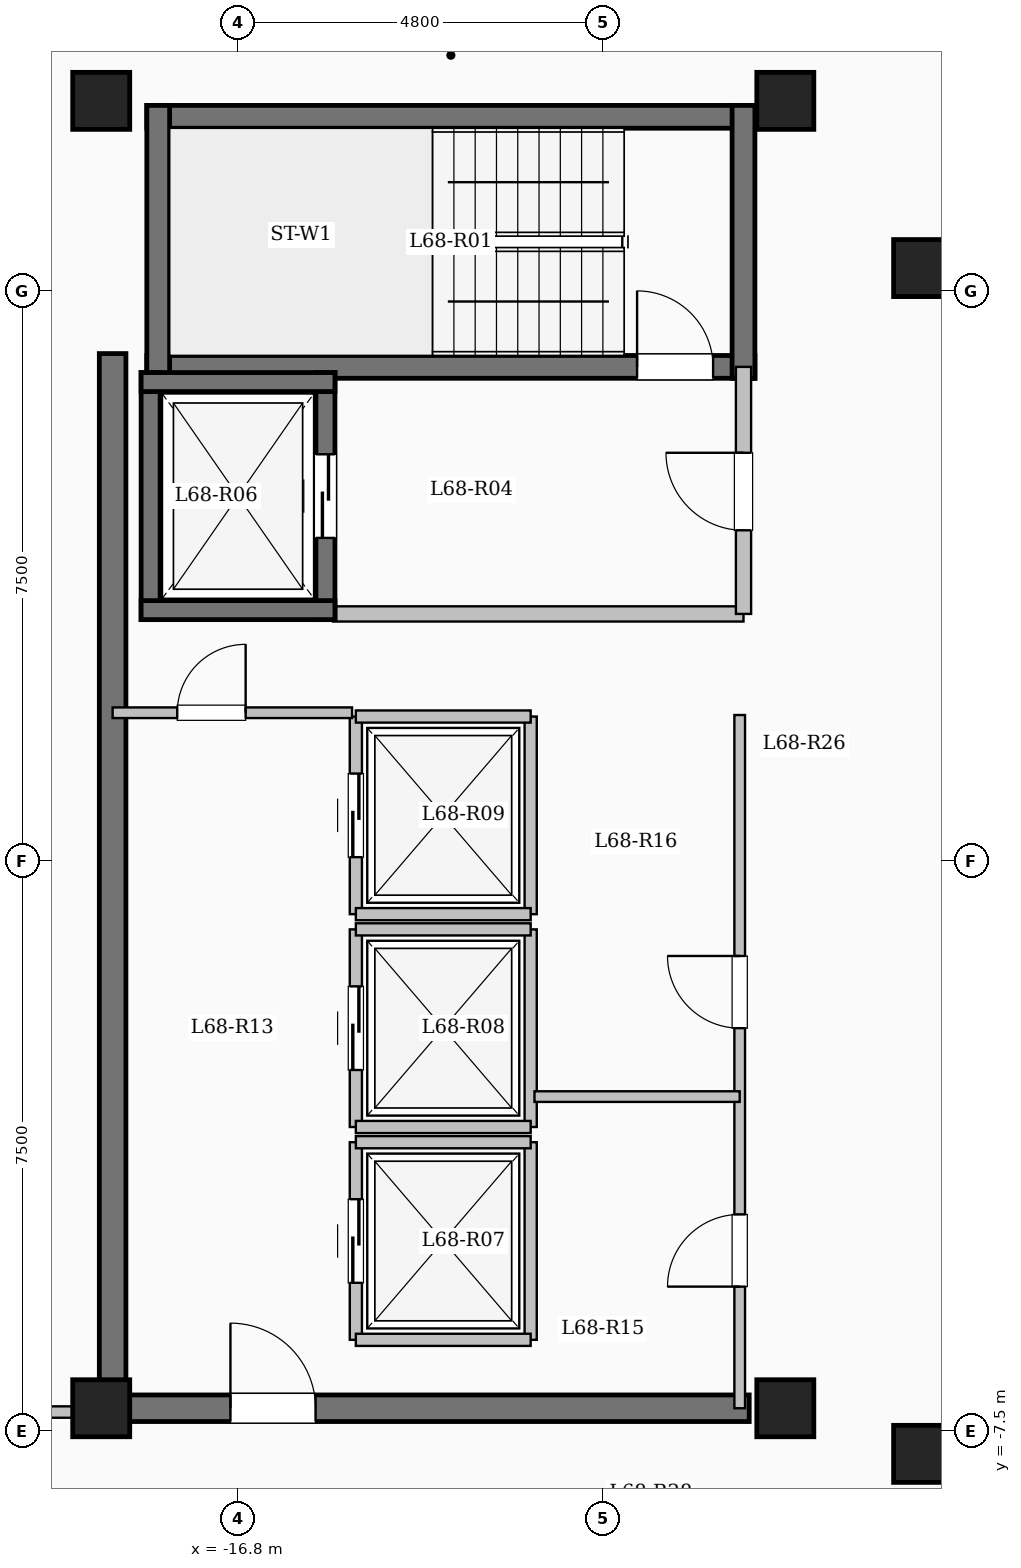
"""IFC4 building model, lengths in metres.
Left out: names, types, materials, properties, quantities, classifications, styles, units other than length and angle.
Written with IfcOpenShell. Run it as: python <this file> out.ifc"""

import sys

from ifc_helpers import new_model, si_unit, direction, frame, frame_2d, origin, origin_2d, place, context, subcontext, project, spatial, rectangle, extrude, element, fill, save


model = new_model("IFC4")
c1 = context("Model", 3, precision=1e-05, world=origin(), true_north=direction((0.0, 1.0)))
c2 = subcontext(c1, "Body", "Model", "MODEL_VIEW")
j1 = project(units=[si_unit("LENGTHUNIT", "METRE"), si_unit("PLANEANGLEUNIT", "RADIAN")], contexts=[c1])
p1 = place(None, origin())
s1 = spatial("IfcSite", under=j1, at=p1, CompositionType="ELEMENT")
p2 = place(p1, origin())
s2 = spatial("IfcBuilding", under=s1, at=p2, CompositionType="ELEMENT")
p3 = place(p2, frame((0.0, 0.0, 251.55)))
s3 = spatial("IfcBuildingStorey", under=s2, at=p3, CompositionType="ELEMENT", Elevation=251.55)
for number, where, z_axis, x_axis in (
    (1, (-7.8, -7.8, 0.0), (0.0, 0.0, 1.0), (1.0, 0.0, 0.0)),
    (2, (-7.8, 7.8, 0.0), (0.0, 0.0, 1.0), (1.0, 0.0, 0.0)),
    (3, (-9.6, -7.2, 0.0), (0.0, 0.0, 1.0), (1.0, 0.0, 0.0)),
    (4, (-9.6, 10.0, 0.0), (0.0, 0.0, 1.0), (1.0, 0.0, 0.0)),
    (5, (-18.6, -7.2, 0.0), (0.0, 0.0, 1.0), (1.0, 0.0, 0.0)),
    (6, (-18.6, 10.0, 0.0), (0.0, 0.0, 1.0), (1.0, 0.0, 0.0)),
):
    element("IfcColumn", number, at=place(p3, frame(where, z_axis=z_axis, x_axis=x_axis)), inside=s3, PredefinedType="COLUMN", context=c2, shape_type="SweptSolid", body=[
        extrude(rectangle(XDim=0.75, YDim=0.75, at=origin_2d()), origin(), (0.0, 0.0, 1.0), 3.35),
    ])
p4 = place(p3, frame((-18.0, 9.79, 0.0), z_axis=(0.0, 0.0, 1.0), x_axis=(1.0, 0.0, 0.0)))
e7 = element("IfcWall", 7, at=p4, inside=s3, PredefinedType="SHEAR", context=c2, shape_type="SweptSolid", body=[
    extrude(rectangle(XDim=8.0, YDim=0.3, at=frame_2d((4.0, 0.0))), origin(), (0.0, 0.0, 1.0), 3.35),
])
p5 = place(p3, frame((-18.0, 6.5, 0.0), z_axis=(0.0, 0.0, 1.0), x_axis=(1.0, 0.0, 0.0)))
e8 = element("IfcWall", 8, at=p5, inside=s3, PredefinedType="SHEAR", context=c2, shape_type="SweptSolid", body=[
    extrude(rectangle(XDim=8.0, YDim=0.3, at=frame_2d((4.0, 0.0))), origin(), (0.0, 0.0, 1.0), 3.35),
])
p6 = place(p5, frame((6.45, 0.0, 0.0)))
e9 = element("IfcOpeningElement", 9, at=p6, cuts=e8, PredefinedType="OPENING", context=c2, shape_type="SweptSolid", body=[
    extrude(rectangle(XDim=1.0, YDim=2.15, at=frame_2d((0.5, 1.075))), frame((0.0, 0.16, 0.0), z_axis=(0.0, -1.0, 0.0), x_axis=(1.0, 0.0, 0.0)), (0.0, 0.0, 1.0), 0.32),
])
for number, where, z_axis, x_axis in (
    (10, (-17.85, 6.35, 0.0), (0.0, 0.0, 1.0), (0.0, 1.0, 0.0)),
    (11, (-10.15, 6.35, 0.0), (0.0, 0.0, 1.0), (0.0, 1.0, 0.0)),
):
    element("IfcWall", number, at=place(p3, frame(where, z_axis=z_axis, x_axis=x_axis)), inside=s3, PredefinedType="SHEAR", context=c2, shape_type="SweptSolid", body=[
        extrude(rectangle(XDim=3.59, YDim=0.3, at=frame_2d((1.795, 0.0))), origin(), (0.0, 0.0, 1.0), 3.35),
    ])
p7 = place(p3, frame((-15.55, 3.25, 0.0), z_axis=(0.0, 0.0, 1.0), x_axis=(1.0, 0.0, 0.0)))
e12 = element("IfcWall", 12, at=p7, inside=s3, PredefinedType="SOLIDWALL", context=c2, shape_type="SweptSolid", body=[
    extrude(rectangle(XDim=5.4, YDim=0.2, at=frame_2d((2.7, 0.0))), origin(), (0.0, 0.0, 1.0), 3.1),
])
p8 = place(p3, frame((-10.15, 3.25, 0.0), z_axis=(0.0, 0.0, 1.0), x_axis=(0.0, 1.0, 0.0)))
e13 = element("IfcWall", 13, at=p8, inside=s3, PredefinedType="SOLIDWALL", context=c2, shape_type="SweptSolid", body=[
    extrude(rectangle(XDim=3.25, YDim=0.2, at=frame_2d((1.625, 0.0))), origin(), (0.0, 0.0, 1.0), 3.1),
])
p9 = place(p8, frame((1.1, 0.0, 0.0)))
e14 = element("IfcOpeningElement", 14, at=p9, cuts=e13, PredefinedType="OPENING", context=c2, shape_type="SweptSolid", body=[
    extrude(rectangle(XDim=1.02, YDim=2.15, at=frame_2d((0.51, 1.075))), frame((0.0, 0.11, 0.0), z_axis=(0.0, -1.0, 0.0), x_axis=(1.0, 0.0, 0.0)), (0.0, 0.0, 1.0), 0.22),
])
p10 = place(p3, frame((-17.95, 3.175, 0.0), z_axis=(0.0, 0.0, 1.0), x_axis=(0.0, 1.0, 0.0)))
e15 = element("IfcWall", 15, at=p10, inside=s3, PredefinedType="SHEAR", context=c2, shape_type="SweptSolid", body=[
    extrude(rectangle(XDim=3.25, YDim=0.25, at=frame_2d((1.625, 0.0))), origin(), (0.0, 0.0, 1.0), 3.35),
])
p11 = place(p3, frame((-15.65, 3.175, 0.0), z_axis=(0.0, 0.0, 1.0), x_axis=(0.0, 1.0, 0.0)))
e16 = element("IfcWall", 16, at=p11, inside=s3, PredefinedType="SHEAR", context=c2, shape_type="SweptSolid", body=[
    extrude(rectangle(XDim=3.25, YDim=0.25, at=frame_2d((1.625, 0.0))), origin(), (0.0, 0.0, 1.0), 3.35),
])
p12 = place(p11, frame((1.075, 0.0, 0.0)))
e17 = element("IfcOpeningElement", 17, at=p12, cuts=e16, PredefinedType="OPENING", context=c2, shape_type="SweptSolid", body=[
    extrude(rectangle(XDim=1.1, YDim=2.15, at=frame_2d((0.55, 1.075))), frame((0.0, 0.135, 0.0), z_axis=(0.0, -1.0, 0.0), x_axis=(1.0, 0.0, 0.0)), (0.0, 0.0, 1.0), 0.27),
])
for number, where, z_axis, x_axis in (
    (18, (-18.075, 3.3, 0.0), (0.0, 0.0, 1.0), (1.0, 0.0, 0.0)),
    (19, (-18.075, 6.3, 0.0), (0.0, 0.0, 1.0), (1.0, 0.0, 0.0)),
):
    element("IfcWall", number, at=place(p3, frame(where, z_axis=z_axis, x_axis=x_axis)), inside=s3, PredefinedType="SHEAR", context=c2, shape_type="SweptSolid", body=[
        extrude(rectangle(XDim=2.55, YDim=0.25, at=frame_2d((1.275, 0.0))), origin(), (0.0, 0.0, 1.0), 3.35),
    ])
p13 = place(p3, frame((-15.25, -6.3, 0.0), z_axis=(0.0, 0.0, 1.0), x_axis=(0.0, 1.0, 0.0)))
e20 = element("IfcWall", 20, at=p13, inside=s3, PredefinedType="SOLIDWALL", context=c2, shape_type="SweptSolid", body=[
    extrude(rectangle(XDim=2.6, YDim=0.16, at=frame_2d((1.3, 0.0))), origin(), (0.0, 0.0, 1.0), 3.1),
])
p14 = place(p13, frame((0.75, 0.0, 0.0)))
e21 = element("IfcOpeningElement", 21, at=p14, cuts=e20, PredefinedType="OPENING", context=c2, shape_type="SweptSolid", body=[
    extrude(rectangle(XDim=1.1, YDim=2.15, at=frame_2d((0.55, 1.075))), frame((0.0, 0.09, 0.0), z_axis=(0.0, -1.0, 0.0), x_axis=(1.0, 0.0, 0.0)), (0.0, 0.0, 1.0), 0.18),
])
p15 = place(p3, frame((-12.95, -6.3, 0.0), z_axis=(0.0, 0.0, 1.0), x_axis=(0.0, 1.0, 0.0)))
e22 = element("IfcWall", 22, at=p15, inside=s3, PredefinedType="SOLIDWALL", context=c2, shape_type="SweptSolid", body=[
    extrude(rectangle(XDim=2.6, YDim=0.16, at=frame_2d((1.3, 0.0))), origin(), (0.0, 0.0, 1.0), 3.1),
])
for number, where, z_axis, x_axis in (
    (23, (-15.25, -6.3, 0.0), (0.0, 0.0, 1.0), (1.0, 0.0, 0.0)),
    (24, (-15.25, -3.7, 0.0), (0.0, 0.0, 1.0), (1.0, 0.0, 0.0)),
):
    element("IfcWall", number, at=place(p3, frame(where, z_axis=z_axis, x_axis=x_axis)), inside=s3, PredefinedType="SOLIDWALL", context=c2, shape_type="SweptSolid", body=[
        extrude(rectangle(XDim=2.3, YDim=0.16, at=frame_2d((1.15, 0.0))), origin(), (0.0, 0.0, 1.0), 3.1),
    ])
p16 = place(p3, frame((-15.25, -3.5, 0.0), z_axis=(0.0, 0.0, 1.0), x_axis=(0.0, 1.0, 0.0)))
e25 = element("IfcWall", 25, at=p16, inside=s3, PredefinedType="SOLIDWALL", context=c2, shape_type="SweptSolid", body=[
    extrude(rectangle(XDim=2.6, YDim=0.16, at=frame_2d((1.3, 0.0))), origin(), (0.0, 0.0, 1.0), 3.1),
])
p17 = place(p16, frame((0.75, 0.0, 0.0)))
e26 = element("IfcOpeningElement", 26, at=p17, cuts=e25, PredefinedType="OPENING", context=c2, shape_type="SweptSolid", body=[
    extrude(rectangle(XDim=1.1, YDim=2.15, at=frame_2d((0.55, 1.075))), frame((0.0, 0.09, 0.0), z_axis=(0.0, -1.0, 0.0), x_axis=(1.0, 0.0, 0.0)), (0.0, 0.0, 1.0), 0.18),
])
p18 = place(p3, frame((-12.95, -3.5, 0.0), z_axis=(0.0, 0.0, 1.0), x_axis=(0.0, 1.0, 0.0)))
e27 = element("IfcWall", 27, at=p18, inside=s3, PredefinedType="SOLIDWALL", context=c2, shape_type="SweptSolid", body=[
    extrude(rectangle(XDim=2.6, YDim=0.16, at=frame_2d((1.3, 0.0))), origin(), (0.0, 0.0, 1.0), 3.1),
])
for number, where, z_axis, x_axis in (
    (28, (-15.25, -3.5, 0.0), (0.0, 0.0, 1.0), (1.0, 0.0, 0.0)),
    (29, (-15.25, -0.9, 0.0), (0.0, 0.0, 1.0), (1.0, 0.0, 0.0)),
):
    element("IfcWall", number, at=place(p3, frame(where, z_axis=z_axis, x_axis=x_axis)), inside=s3, PredefinedType="SOLIDWALL", context=c2, shape_type="SweptSolid", body=[
        extrude(rectangle(XDim=2.3, YDim=0.16, at=frame_2d((1.15, 0.0))), origin(), (0.0, 0.0, 1.0), 3.1),
    ])
p19 = place(p3, frame((-15.25, -0.7, 0.0), z_axis=(0.0, 0.0, 1.0), x_axis=(0.0, 1.0, 0.0)))
e30 = element("IfcWall", 30, at=p19, inside=s3, PredefinedType="SOLIDWALL", context=c2, shape_type="SweptSolid", body=[
    extrude(rectangle(XDim=2.6, YDim=0.16, at=frame_2d((1.3, 0.0))), origin(), (0.0, 0.0, 1.0), 3.1),
])
p20 = place(p19, frame((0.75, 0.0, 0.0)))
e31 = element("IfcOpeningElement", 31, at=p20, cuts=e30, PredefinedType="OPENING", context=c2, shape_type="SweptSolid", body=[
    extrude(rectangle(XDim=1.1, YDim=2.15, at=frame_2d((0.55, 1.075))), frame((0.0, 0.09, 0.0), z_axis=(0.0, -1.0, 0.0), x_axis=(1.0, 0.0, 0.0)), (0.0, 0.0, 1.0), 0.18),
])
p21 = place(p3, frame((-12.95, -0.7, 0.0), z_axis=(0.0, 0.0, 1.0), x_axis=(0.0, 1.0, 0.0)))
e32 = element("IfcWall", 32, at=p21, inside=s3, PredefinedType="SOLIDWALL", context=c2, shape_type="SweptSolid", body=[
    extrude(rectangle(XDim=2.6, YDim=0.16, at=frame_2d((1.3, 0.0))), origin(), (0.0, 0.0, 1.0), 3.1),
])
for number, where, z_axis, x_axis in (
    (33, (-15.25, -0.7, 0.0), (0.0, 0.0, 1.0), (1.0, 0.0, 0.0)),
    (34, (-15.25, 1.9, 0.0), (0.0, 0.0, 1.0), (1.0, 0.0, 0.0)),
):
    element("IfcWall", number, at=place(p3, frame(where, z_axis=z_axis, x_axis=x_axis)), inside=s3, PredefinedType="SOLIDWALL", context=c2, shape_type="SweptSolid", body=[
        extrude(rectangle(XDim=2.3, YDim=0.16, at=frame_2d((1.15, 0.0))), origin(), (0.0, 0.0, 1.0), 3.1),
    ])
p22 = place(p3, frame((-18.45, -7.375, 0.0), z_axis=(0.0, 0.0, 1.0), x_axis=(0.0, 1.0, 0.0)))
e35 = element("IfcWall", 35, at=p22, inside=s3, PredefinedType="SHEAR", context=c2, shape_type="SweptSolid", body=[
    extrude(rectangle(XDim=14.05, YDim=0.35, at=frame_2d((7.025, 0.0))), origin(), (0.0, 0.0, 1.0), 3.35),
])
p23 = place(p3, frame((-18.625, -7.2, 0.0), z_axis=(0.0, 0.0, 1.0), x_axis=(1.0, 0.0, 0.0)))
e36 = element("IfcWall", 36, at=p23, inside=s3, PredefinedType="SHEAR", context=c2, shape_type="SweptSolid", body=[
    extrude(rectangle(XDim=8.55, YDim=0.35, at=frame_2d((4.275, 0.0))), origin(), (0.0, 0.0, 1.0), 3.35),
])
p24 = place(p23, frame((1.725, 0.0, 0.0)))
e37 = element("IfcOpeningElement", 37, at=p24, cuts=e36, PredefinedType="OPENING", context=c2, shape_type="SweptSolid", body=[
    extrude(rectangle(XDim=1.12, YDim=2.15, at=frame_2d((0.56, 1.075))), frame((0.0, 0.185, 0.0), z_axis=(0.0, -1.0, 0.0), x_axis=(1.0, 0.0, 0.0)), (0.0, 0.0, 1.0), 0.37),
])
p25 = place(p3, frame((-18.45, 1.95, 0.0), z_axis=(0.0, 0.0, 1.0), x_axis=(1.0, 0.0, 0.0)))
e38 = element("IfcWall", 38, at=p25, inside=s3, PredefinedType="PARTITIONING", context=c2, shape_type="SweptSolid", body=[
    extrude(rectangle(XDim=3.15, YDim=0.14, at=frame_2d((1.575, 0.0))), origin(), (0.0, 0.0, 1.0), 3.1),
])
p26 = place(p25, frame((0.85, 0.0, 0.0)))
e39 = element("IfcOpeningElement", 39, at=p26, cuts=e38, PredefinedType="OPENING", context=c2, shape_type="SweptSolid", body=[
    extrude(rectangle(XDim=0.9, YDim=2.08, at=frame_2d((0.45, 1.04))), frame((0.0, 0.08, 0.0), z_axis=(0.0, -1.0, 0.0), x_axis=(1.0, 0.0, 0.0)), (0.0, 0.0, 1.0), 0.16),
])
p27 = place(p3, frame((-10.2, -7.2, 0.0), z_axis=(0.0, 0.0, 1.0), x_axis=(0.0, 1.0, 0.0)))
e40 = element("IfcWall", 40, at=p27, inside=s3, PredefinedType="PARTITIONING", context=c2, shape_type="SweptSolid", body=[
    extrude(rectangle(XDim=9.12, YDim=0.14, at=frame_2d((4.56, 0.0))), origin(), (0.0, 0.0, 1.0), 3.1),
])
p28 = place(p27, frame((1.6, 0.0, 0.0)))
e41 = element("IfcOpeningElement", 41, at=p28, cuts=e40, PredefinedType="OPENING", context=c2, shape_type="SweptSolid", body=[
    extrude(rectangle(XDim=0.95, YDim=2.12, at=frame_2d((0.475, 1.06))), frame((0.0, 0.08, 0.0), z_axis=(0.0, -1.0, 0.0), x_axis=(1.0, 0.0, 0.0)), (0.0, 0.0, 1.0), 0.16),
])
p29 = place(p27, frame((5.0, 0.0, 0.0)))
e42 = element("IfcOpeningElement", 42, at=p29, cuts=e40, PredefinedType="OPENING", context=c2, shape_type="SweptSolid", body=[
    extrude(rectangle(XDim=0.95, YDim=2.12, at=frame_2d((0.475, 1.06))), frame((0.0, 0.08, 0.0), z_axis=(0.0, -1.0, 0.0), x_axis=(1.0, 0.0, 0.0)), (0.0, 0.0, 1.0), 0.16),
])
p30 = place(p3, frame((-12.9, -3.1, 0.0), z_axis=(0.0, 0.0, 1.0), x_axis=(1.0, 0.0, 0.0)))
e43 = element("IfcWall", 43, at=p30, inside=s3, PredefinedType="PARTITIONING", context=c2, shape_type="SweptSolid", body=[
    extrude(rectangle(XDim=2.7, YDim=0.14, at=frame_2d((1.35, 0.0))), origin(), (0.0, 0.0, 1.0), 3.1),
])
p31 = place(p3, frame((-22.68, -7.25, 0.0), z_axis=(0.0, 0.0, 1.0), x_axis=(1.0, 0.0, 0.0)))
e44 = element("IfcWall", 44, at=p31, inside=s3, PredefinedType="PARTITIONING", context=c2, shape_type="SweptSolid", body=[
    extrude(rectangle(XDim=4.23, YDim=0.15, at=frame_2d((2.115, 0.0))), origin(), (0.0, 0.0, 1.0), 3.1),
])
p32 = place(p31, frame((1.63, 0.0, 0.0)))
e45 = element("IfcOpeningElement", 45, at=p32, cuts=e44, PredefinedType="OPENING", context=c2, shape_type="SweptSolid", body=[
    extrude(rectangle(XDim=1.08, YDim=2.15, at=frame_2d((0.54, 1.075))), frame((0.0, 0.085, 0.0), z_axis=(0.0, -1.0, 0.0), x_axis=(1.0, 0.0, 0.0)), (0.0, 0.0, 1.0), 0.17),
])
p33 = place(p6, origin())
e46 = element("IfcDoor", 46, at=p33, inside=s3, OperationType="SINGLE_SWING_LEFT", PredefinedType="DOOR", context=c2, shape_type="SweptSolid", body=[
    extrude(rectangle(XDim=1.0, YDim=2.15, at=frame_2d((0.5, 1.075))), frame((0.0, 0.025, 0.0), z_axis=(0.0, -1.0, 0.0), x_axis=(1.0, 0.0, 0.0)), (0.0, 0.0, 1.0), 0.05),
])
fill(e9, e46)
p34 = place(p9, origin())
e47 = element("IfcDoor", 47, at=p34, inside=s3, OperationType="SINGLE_SWING_RIGHT", PredefinedType="DOOR", context=c2, shape_type="SweptSolid", body=[
    extrude(rectangle(XDim=1.02, YDim=2.15, at=frame_2d((0.51, 1.075))), frame((0.0, 0.025, 0.0), z_axis=(0.0, -1.0, 0.0), x_axis=(1.0, 0.0, 0.0)), (0.0, 0.0, 1.0), 0.05),
])
fill(e14, e47)
p35 = place(p12, origin())
e48 = element("IfcDoor", 48, at=p35, inside=s3, OperationType="SLIDING_TO_LEFT", PredefinedType="DOOR", context=c2, shape_type="SweptSolid", body=[
    extrude(rectangle(XDim=1.1, YDim=2.15, at=frame_2d((0.55, 1.075))), frame((0.0, 0.025, 0.0), z_axis=(0.0, -1.0, 0.0), x_axis=(1.0, 0.0, 0.0)), (0.0, 0.0, 1.0), 0.05),
])
fill(e17, e48)
p36 = place(p14, origin())
e49 = element("IfcDoor", 49, at=p36, inside=s3, OperationType="SLIDING_TO_LEFT", PredefinedType="DOOR", context=c2, shape_type="SweptSolid", body=[
    extrude(rectangle(XDim=1.1, YDim=2.15, at=frame_2d((0.55, 1.075))), frame((0.0, 0.025, 0.0), z_axis=(0.0, -1.0, 0.0), x_axis=(1.0, 0.0, 0.0)), (0.0, 0.0, 1.0), 0.05),
])
fill(e21, e49)
p37 = place(p17, origin())
e50 = element("IfcDoor", 50, at=p37, inside=s3, OperationType="SLIDING_TO_LEFT", PredefinedType="DOOR", context=c2, shape_type="SweptSolid", body=[
    extrude(rectangle(XDim=1.1, YDim=2.15, at=frame_2d((0.55, 1.075))), frame((0.0, 0.025, 0.0), z_axis=(0.0, -1.0, 0.0), x_axis=(1.0, 0.0, 0.0)), (0.0, 0.0, 1.0), 0.05),
])
fill(e26, e50)
p38 = place(p20, origin())
e51 = element("IfcDoor", 51, at=p38, inside=s3, OperationType="SLIDING_TO_LEFT", PredefinedType="DOOR", context=c2, shape_type="SweptSolid", body=[
    extrude(rectangle(XDim=1.1, YDim=2.15, at=frame_2d((0.55, 1.075))), frame((0.0, 0.025, 0.0), z_axis=(0.0, -1.0, 0.0), x_axis=(1.0, 0.0, 0.0)), (0.0, 0.0, 1.0), 0.05),
])
fill(e31, e51)
p39 = place(p24, origin())
e52 = element("IfcDoor", 52, at=p39, inside=s3, OperationType="SINGLE_SWING_LEFT", PredefinedType="DOOR", context=c2, shape_type="SweptSolid", body=[
    extrude(rectangle(XDim=1.12, YDim=2.15, at=frame_2d((0.56, 1.075))), frame((0.0, 0.025, 0.0), z_axis=(0.0, -1.0, 0.0), x_axis=(1.0, 0.0, 0.0)), (0.0, 0.0, 1.0), 0.05),
])
fill(e37, e52)
p40 = place(p26, origin())
e53 = element("IfcDoor", 53, at=p40, inside=s3, OperationType="SINGLE_SWING_RIGHT", PredefinedType="DOOR", context=c2, shape_type="SweptSolid", body=[
    extrude(rectangle(XDim=0.9, YDim=2.08, at=frame_2d((0.45, 1.04))), frame((0.0, 0.025, 0.0), z_axis=(0.0, -1.0, 0.0), x_axis=(1.0, 0.0, 0.0)), (0.0, 0.0, 1.0), 0.05),
])
fill(e39, e53)
p41 = place(p28, origin())
e54 = element("IfcDoor", 54, at=p41, inside=s3, OperationType="SINGLE_SWING_LEFT", PredefinedType="DOOR", context=c2, shape_type="SweptSolid", body=[
    extrude(rectangle(XDim=0.95, YDim=2.12, at=frame_2d((0.475, 1.06))), frame((0.0, 0.025, 0.0), z_axis=(0.0, -1.0, 0.0), x_axis=(1.0, 0.0, 0.0)), (0.0, 0.0, 1.0), 0.05),
])
fill(e41, e54)
p42 = place(p29, origin())
e55 = element("IfcDoor", 55, at=p42, inside=s3, OperationType="SINGLE_SWING_RIGHT", PredefinedType="DOOR", context=c2, shape_type="SweptSolid", body=[
    extrude(rectangle(XDim=0.95, YDim=2.12, at=frame_2d((0.475, 1.06))), frame((0.0, 0.025, 0.0), z_axis=(0.0, -1.0, 0.0), x_axis=(1.0, 0.0, 0.0)), (0.0, 0.0, 1.0), 0.05),
])
fill(e42, e55)
save(model, sys.argv[1])
